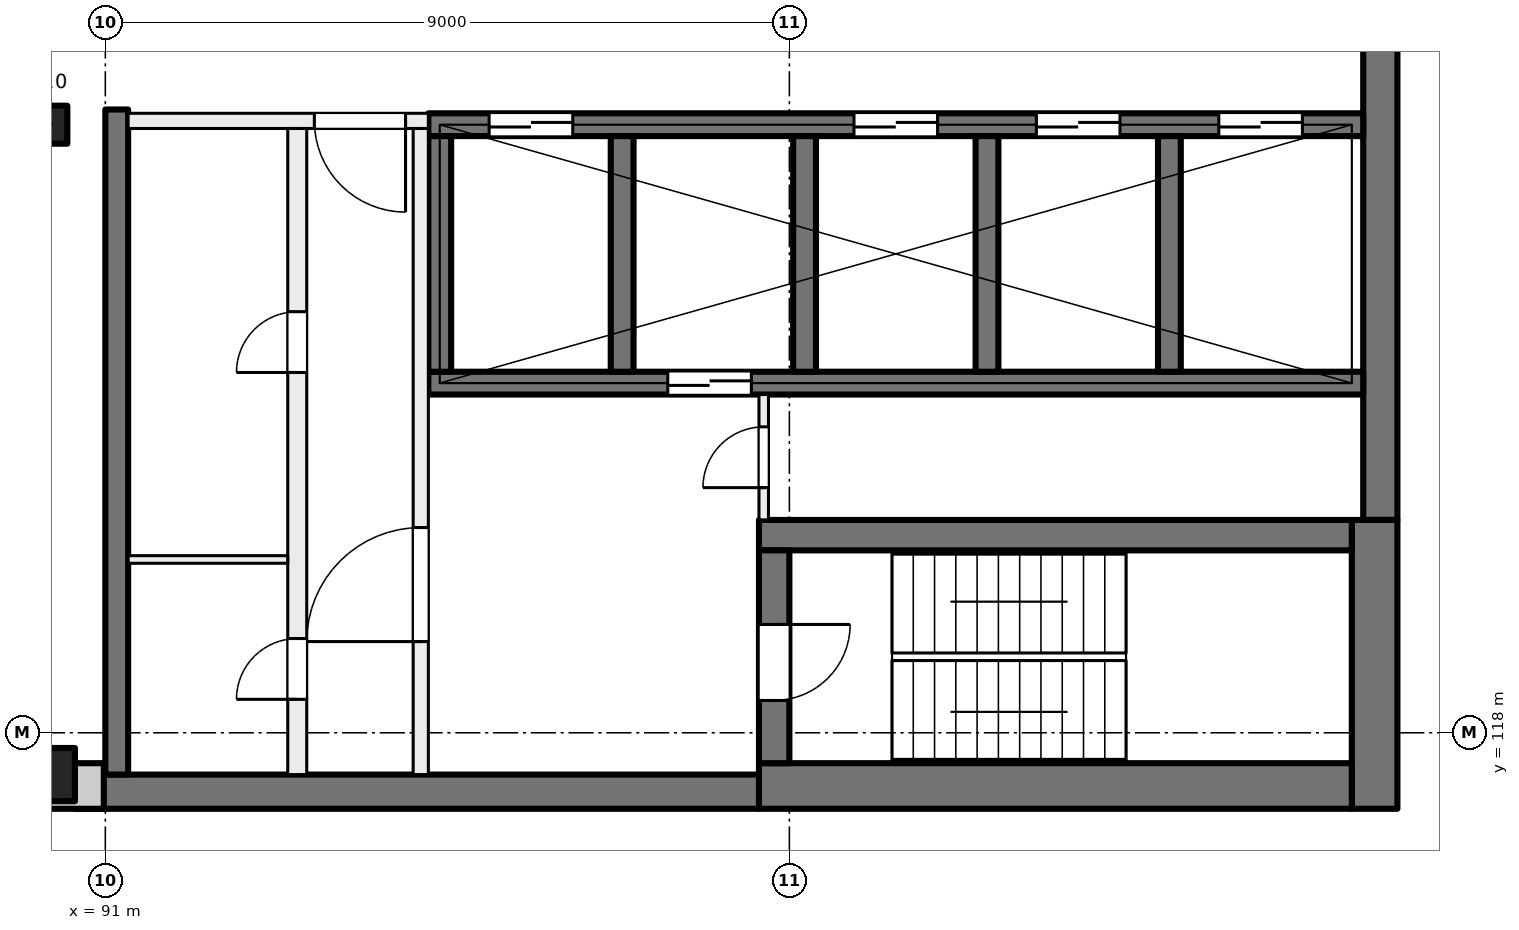
"""IFC4 building model, lengths in metres.
Left out: names, types, materials, properties, quantities, classifications, styles, units other than length and angle.
Written with IfcOpenShell. Run it as: python <this file> out.ifc"""

import sys

from ifc_helpers import new_model, si_unit, direction, frame, frame_2d, origin, origin_2d, place, context, subcontext, project, spatial, rectangle, extrude, element, fill, save


model = new_model("IFC4")
c1 = context("Model", 3, precision=1e-05, world=origin(), true_north=direction((0.0, 1.0)))
c2 = subcontext(c1, "Body", "Model", "MODEL_VIEW")
j1 = project(units=[si_unit("LENGTHUNIT", "METRE"), si_unit("PLANEANGLEUNIT", "RADIAN")], contexts=[c1])
p1 = place(None, origin())
s1 = spatial("IfcSite", under=j1, at=p1, CompositionType="ELEMENT")
p2 = place(p1, origin())
s2 = spatial("IfcBuilding", under=s1, at=p2, CompositionType="ELEMENT")
p3 = place(p2, frame((0.0, 0.0, 249.5)))
s3 = spatial("IfcBuildingStorey", under=s2, at=p3, CompositionType="ELEMENT", Elevation=249.5)
p4 = place(p3, frame((90.25, 126.0, 0.0), z_axis=(0.0, 0.0, 1.0), x_axis=(1.0, 0.0, 0.0)))
e1 = element("IfcColumn", 1, at=p4, inside=s3, PredefinedType="COLUMN", context=c2, shape_type="SweptSolid", body=[
    extrude(rectangle(XDim=0.5, YDim=0.5, at=origin_2d()), origin(), (0.0, 0.0, 1.0), 4.0),
])
p5 = place(p3, frame((90.25, 117.45, 0.0), z_axis=(0.0, 0.0, 1.0), x_axis=(1.0, 0.0, 0.0)))
e2 = element("IfcColumn", 2, at=p5, inside=s3, PredefinedType="COLUMN", context=c2, shape_type="SweptSolid", body=[
    extrude(rectangle(XDim=0.7, YDim=0.7, at=origin_2d()), origin(), (0.0, 0.0, 1.0), 4.0),
])
p6 = place(p3, frame((107.775, 135.2, 0.0), z_axis=(0.0, 0.0, 1.0), x_axis=(0.0, -1.0, 0.0)))
e3 = element("IfcWall", 3, at=p6, inside=s3, PredefinedType="SHEAR", context=c2, shape_type="SweptSolid", body=[
    extrude(rectangle(XDim=14.4, YDim=0.45, at=frame_2d((7.2, 0.0))), origin(), (0.0, 0.0, 1.0), 4.0),
])
p7 = place(p3, frame((107.7, 120.8, 0.0), z_axis=(0.0, 0.0, 1.0), x_axis=(0.0, -1.0, 0.0)))
e4 = element("IfcWall", 4, at=p7, inside=s3, PredefinedType="SHEAR", context=c2, shape_type="SweptSolid", body=[
    extrude(rectangle(XDim=3.8, YDim=0.6, at=frame_2d((1.9, 0.0))), origin(), (0.0, 0.0, 1.0), 4.0),
])
p8 = place(p3, frame((107.4, 117.3, 0.0), z_axis=(0.0, 0.0, 1.0), x_axis=(-1.0, 0.0, 0.0)))
e5 = element("IfcWall", 5, at=p8, inside=s3, PredefinedType="SHEAR", context=c2, shape_type="SweptSolid", body=[
    extrude(rectangle(XDim=7.8, YDim=0.6, at=frame_2d((3.9, 0.0))), origin(), (0.0, 0.0, 1.0), 4.0),
])
p9 = place(p3, frame((99.6, 117.225, 0.0), z_axis=(0.0, 0.0, 1.0), x_axis=(-1.0, 0.0, 0.0)))
e6 = element("IfcWall", 6, at=p9, inside=s3, PredefinedType="SHEAR", context=c2, shape_type="SweptSolid", body=[
    extrude(rectangle(XDim=9.0, YDim=0.45, at=frame_2d((4.5, 0.0))), origin(), (0.0, 0.0, 1.0), 4.0),
])
p10 = place(p3, frame((107.4, 120.6, 0.0), z_axis=(0.0, 0.0, 1.0), x_axis=(-1.0, 0.0, 0.0)))
e7 = element("IfcWall", 7, at=p10, inside=s3, PredefinedType="SHEAR", context=c2, shape_type="SweptSolid", body=[
    extrude(rectangle(XDim=7.8, YDim=0.4, at=frame_2d((3.9, 0.0))), origin(), (0.0, 0.0, 1.0), 4.0),
])
p11 = place(p3, frame((99.8, 120.4, 0.0), z_axis=(0.0, 0.0, 1.0), x_axis=(0.0, -1.0, 0.0)))
e8 = element("IfcWall", 8, at=p11, inside=s3, PredefinedType="SHEAR", context=c2, shape_type="SweptSolid", body=[
    extrude(rectangle(XDim=2.8, YDim=0.4, at=frame_2d((1.4, 0.0))), origin(), (0.0, 0.0, 1.0), 4.0),
])
p12 = place(p11, frame((0.975, 0.0, 0.0)))
e9 = element("IfcOpeningElement", 9, at=p12, cuts=e8, PredefinedType="OPENING", context=c2, shape_type="SweptSolid", body=[
    extrude(rectangle(XDim=1.0, YDim=2.1, at=frame_2d((0.5, 1.05))), frame((0.0, 0.21, 0.0), z_axis=(0.0, -1.0, 0.0), x_axis=(1.0, 0.0, 0.0)), (0.0, 0.0, 1.0), 0.42),
])
p13 = place(p3, frame((107.55, 126.0, 0.0), z_axis=(0.0, 0.0, 1.0), x_axis=(-1.0, 0.0, 0.0)))
e10 = element("IfcWall", 10, at=p13, inside=s3, PredefinedType="SHEAR", context=c2, shape_type="SweptSolid", body=[
    extrude(rectangle(XDim=12.3, YDim=0.3, at=frame_2d((6.15, 0.0))), origin(), (0.0, 0.0, 1.0), 4.0),
])
p14 = place(p13, frame((0.8, 0.0, 0.0)))
e11 = element("IfcOpeningElement", 11, at=p14, cuts=e10, PredefinedType="OPENING", context=c2, shape_type="SweptSolid", body=[
    extrude(rectangle(XDim=1.1, YDim=2.1, at=frame_2d((0.55, 1.05))), frame((0.0, 0.16, 0.0), z_axis=(0.0, -1.0, 0.0), x_axis=(1.0, 0.0, 0.0)), (0.0, 0.0, 1.0), 0.32),
])
p15 = place(p13, frame((3.2, 0.0, 0.0)))
e12 = element("IfcOpeningElement", 12, at=p15, cuts=e10, PredefinedType="OPENING", context=c2, shape_type="SweptSolid", body=[
    extrude(rectangle(XDim=1.1, YDim=2.1, at=frame_2d((0.55, 1.05))), frame((0.0, 0.16, 0.0), z_axis=(0.0, -1.0, 0.0), x_axis=(1.0, 0.0, 0.0)), (0.0, 0.0, 1.0), 0.32),
])
p16 = place(p13, frame((5.6, 0.0, 0.0)))
e13 = element("IfcOpeningElement", 13, at=p16, cuts=e10, PredefinedType="OPENING", context=c2, shape_type="SweptSolid", body=[
    extrude(rectangle(XDim=1.1, YDim=2.1, at=frame_2d((0.55, 1.05))), frame((0.0, 0.16, 0.0), z_axis=(0.0, -1.0, 0.0), x_axis=(1.0, 0.0, 0.0)), (0.0, 0.0, 1.0), 0.32),
])
p17 = place(p13, frame((10.4, 0.0, 0.0)))
e14 = element("IfcOpeningElement", 14, at=p17, cuts=e10, PredefinedType="OPENING", context=c2, shape_type="SweptSolid", body=[
    extrude(rectangle(XDim=1.1, YDim=2.1, at=frame_2d((0.55, 1.05))), frame((0.0, 0.16, 0.0), z_axis=(0.0, -1.0, 0.0), x_axis=(1.0, 0.0, 0.0)), (0.0, 0.0, 1.0), 0.32),
])
p18 = place(p3, frame((107.55, 122.6, 0.0), z_axis=(0.0, 0.0, 1.0), x_axis=(-1.0, 0.0, 0.0)))
e15 = element("IfcWall", 15, at=p18, inside=s3, PredefinedType="SHEAR", context=c2, shape_type="SweptSolid", body=[
    extrude(rectangle(XDim=12.3, YDim=0.3, at=frame_2d((6.15, 0.0))), origin(), (0.0, 0.0, 1.0), 4.0),
])
p19 = place(p18, frame((8.05, 0.0, 0.0)))
e16 = element("IfcOpeningElement", 16, at=p19, cuts=e15, PredefinedType="OPENING", context=c2, shape_type="SweptSolid", body=[
    extrude(rectangle(XDim=1.1, YDim=2.1, at=frame_2d((0.55, 1.05))), frame((0.0, 0.16, 0.0), z_axis=(0.0, -1.0, 0.0), x_axis=(1.0, 0.0, 0.0)), (0.0, 0.0, 1.0), 0.32),
])
for number, where, z_axis, x_axis in (
    (17, (105.0, 125.85, 0.0), (0.0, 0.0, 1.0), (0.0, -1.0, 0.0)),
    (18, (102.6, 125.85, 0.0), (0.0, 0.0, 1.0), (0.0, -1.0, 0.0)),
    (19, (100.2, 125.85, 0.0), (0.0, 0.0, 1.0), (0.0, -1.0, 0.0)),
    (20, (97.8, 125.85, 0.0), (0.0, 0.0, 1.0), (0.0, -1.0, 0.0)),
    (21, (95.4, 125.85, 0.0), (0.0, 0.0, 1.0), (0.0, -1.0, 0.0)),
):
    element("IfcWall", number, at=place(p3, frame(where, z_axis=z_axis, x_axis=x_axis)), inside=s3, PredefinedType="SHEAR", context=c2, shape_type="SweptSolid", body=[
        extrude(rectangle(XDim=3.1, YDim=0.3, at=frame_2d((1.55, 0.0))), origin(), (0.0, 0.0, 1.0), 4.0),
    ])
p20 = place(p3, frame((91.15, 126.2, 0.0), z_axis=(0.0, 0.0, 1.0), x_axis=(0.0, -1.0, 0.0)))
e22 = element("IfcWall", 22, at=p20, inside=s3, PredefinedType="SHEAR", context=c2, shape_type="SweptSolid", body=[
    extrude(rectangle(XDim=8.75, YDim=0.3, at=frame_2d((4.375, 0.0))), origin(), (0.0, 0.0, 1.0), 4.0),
])
p21 = place(p3, frame((90.98, 117.3, 0.0), z_axis=(0.0, 0.0, 1.0), x_axis=(-1.0, 0.0, 0.0)))
e23 = element("IfcWall", 23, at=p21, inside=s3, PredefinedType="SOLIDWALL", context=c2, shape_type="SweptSolid", body=[
    extrude(rectangle(XDim=43.98, YDim=0.6, at=frame_2d((21.99, 0.0))), origin(), (0.0, 0.0, 1.0), 3.625),
])
p22 = place(p21, frame((1.48, 0.0, 0.9)))
e24 = element("IfcOpeningElement", 24, at=p22, cuts=e23, PredefinedType="OPENING", context=c2, shape_type="SweptSolid", body=[
    extrude(rectangle(XDim=3.0, YDim=2.4, at=frame_2d((1.5, 1.2))), frame((0.0, 0.31, 0.0), z_axis=(0.0, -1.0, 0.0), x_axis=(1.0, 0.0, 0.0)), (0.0, 0.0, 1.0), 0.62),
])
p23 = place(p21, frame((5.98, 0.0, 0.9)))
e25 = element("IfcOpeningElement", 25, at=p23, cuts=e23, PredefinedType="OPENING", context=c2, shape_type="SweptSolid", body=[
    extrude(rectangle(XDim=3.0, YDim=2.4, at=frame_2d((1.5, 1.2))), frame((0.0, 0.31, 0.0), z_axis=(0.0, -1.0, 0.0), x_axis=(1.0, 0.0, 0.0)), (0.0, 0.0, 1.0), 0.62),
])
p24 = place(p21, frame((10.48, 0.0, 0.9)))
e26 = element("IfcOpeningElement", 26, at=p24, cuts=e23, PredefinedType="OPENING", context=c2, shape_type="SweptSolid", body=[
    extrude(rectangle(XDim=3.0, YDim=2.4, at=frame_2d((1.5, 1.2))), frame((0.0, 0.31, 0.0), z_axis=(0.0, -1.0, 0.0), x_axis=(1.0, 0.0, 0.0)), (0.0, 0.0, 1.0), 0.62),
])
p25 = place(p21, frame((14.98, 0.0, 0.9)))
e27 = element("IfcOpeningElement", 27, at=p25, cuts=e23, PredefinedType="OPENING", context=c2, shape_type="SweptSolid", body=[
    extrude(rectangle(XDim=3.0, YDim=2.4, at=frame_2d((1.5, 1.2))), frame((0.0, 0.31, 0.0), z_axis=(0.0, -1.0, 0.0), x_axis=(1.0, 0.0, 0.0)), (0.0, 0.0, 1.0), 0.62),
])
p26 = place(p21, frame((19.48, 0.0, 0.9)))
e28 = element("IfcOpeningElement", 28, at=p26, cuts=e23, PredefinedType="OPENING", context=c2, shape_type="SweptSolid", body=[
    extrude(rectangle(XDim=3.0, YDim=2.4, at=frame_2d((1.5, 1.2))), frame((0.0, 0.31, 0.0), z_axis=(0.0, -1.0, 0.0), x_axis=(1.0, 0.0, 0.0)), (0.0, 0.0, 1.0), 0.62),
])
p27 = place(p21, frame((23.98, 0.0, 0.9)))
e29 = element("IfcOpeningElement", 29, at=p27, cuts=e23, PredefinedType="OPENING", context=c2, shape_type="SweptSolid", body=[
    extrude(rectangle(XDim=3.0, YDim=2.4, at=frame_2d((1.5, 1.2))), frame((0.0, 0.31, 0.0), z_axis=(0.0, -1.0, 0.0), x_axis=(1.0, 0.0, 0.0)), (0.0, 0.0, 1.0), 0.62),
])
p28 = place(p21, frame((28.48, 0.0, 0.9)))
e30 = element("IfcOpeningElement", 30, at=p28, cuts=e23, PredefinedType="OPENING", context=c2, shape_type="SweptSolid", body=[
    extrude(rectangle(XDim=3.0, YDim=2.4, at=frame_2d((1.5, 1.2))), frame((0.0, 0.31, 0.0), z_axis=(0.0, -1.0, 0.0), x_axis=(1.0, 0.0, 0.0)), (0.0, 0.0, 1.0), 0.62),
])
p29 = place(p21, frame((32.98, 0.0, 0.9)))
e31 = element("IfcOpeningElement", 31, at=p29, cuts=e23, PredefinedType="OPENING", context=c2, shape_type="SweptSolid", body=[
    extrude(rectangle(XDim=3.0, YDim=2.4, at=frame_2d((1.5, 1.2))), frame((0.0, 0.31, 0.0), z_axis=(0.0, -1.0, 0.0), x_axis=(1.0, 0.0, 0.0)), (0.0, 0.0, 1.0), 0.62),
])
p30 = place(p21, frame((37.48, 0.0, 0.9)))
e32 = element("IfcOpeningElement", 32, at=p30, cuts=e23, PredefinedType="OPENING", context=c2, shape_type="SweptSolid", body=[
    extrude(rectangle(XDim=3.0, YDim=2.4, at=frame_2d((1.5, 1.2))), frame((0.0, 0.31, 0.0), z_axis=(0.0, -1.0, 0.0), x_axis=(1.0, 0.0, 0.0)), (0.0, 0.0, 1.0), 0.62),
])
p31 = place(p3, frame((95.25, 126.05, 0.0), z_axis=(0.0, 0.0, 1.0), x_axis=(-1.0, 0.0, 0.0)))
e33 = element("IfcWall", 33, at=p31, inside=s3, PredefinedType="PARTITIONING", context=c2, shape_type="SweptSolid", body=[
    extrude(rectangle(XDim=3.95, YDim=0.2, at=frame_2d((1.975, 0.0))), origin(), (0.0, 0.0, 1.0), 3.625),
])
p32 = place(p31, frame((0.3, 0.0, 0.0)))
e34 = element("IfcOpeningElement", 34, at=p32, cuts=e33, PredefinedType="OPENING", context=c2, shape_type="SweptSolid", body=[
    extrude(rectangle(XDim=1.2, YDim=2.1, at=frame_2d((0.6, 1.05))), frame((0.0, 0.11, 0.0), z_axis=(0.0, -1.0, 0.0), x_axis=(1.0, 0.0, 0.0)), (0.0, 0.0, 1.0), 0.22),
])
p33 = place(p3, frame((95.15, 117.45, 0.0), z_axis=(0.0, 0.0, 1.0), x_axis=(0.0, 1.0, 0.0)))
e35 = element("IfcWall", 35, at=p33, inside=s3, PredefinedType="PARTITIONING", context=c2, shape_type="SweptSolid", body=[
    extrude(rectangle(XDim=8.5, YDim=0.2, at=frame_2d((4.25, 0.0))), origin(), (0.0, 0.0, 1.0), 3.625),
])
p34 = place(p33, frame((1.75, 0.0, 0.0)))
e36 = element("IfcOpeningElement", 36, at=p34, cuts=e35, PredefinedType="OPENING", context=c2, shape_type="SweptSolid", body=[
    extrude(rectangle(XDim=1.5, YDim=2.1, at=frame_2d((0.75, 1.05))), frame((0.0, 0.11, 0.0), z_axis=(0.0, -1.0, 0.0), x_axis=(1.0, 0.0, 0.0)), (0.0, 0.0, 1.0), 0.22),
])
p35 = place(p3, frame((93.525, 117.45, 0.0), z_axis=(0.0, 0.0, 1.0), x_axis=(0.0, 1.0, 0.0)))
e37 = element("IfcWall", 37, at=p35, inside=s3, PredefinedType="PARTITIONING", context=c2, shape_type="SweptSolid", body=[
    extrude(rectangle(XDim=8.5, YDim=0.25, at=frame_2d((4.25, 0.0))), origin(), (0.0, 0.0, 1.0), 3.625),
])
p36 = place(p35, frame((5.29, 0.0, 0.0)))
e38 = element("IfcOpeningElement", 38, at=p36, cuts=e37, PredefinedType="OPENING", context=c2, shape_type="SweptSolid", body=[
    extrude(rectangle(XDim=0.8, YDim=2.1, at=frame_2d((0.4, 1.05))), frame((0.0, 0.135, 0.0), z_axis=(0.0, -1.0, 0.0), x_axis=(1.0, 0.0, 0.0)), (0.0, 0.0, 1.0), 0.27),
])
p37 = place(p35, frame((0.99, 0.0, 0.0)))
e39 = element("IfcOpeningElement", 39, at=p37, cuts=e37, PredefinedType="OPENING", context=c2, shape_type="SweptSolid", body=[
    extrude(rectangle(XDim=0.8, YDim=2.1, at=frame_2d((0.4, 1.05))), frame((0.0, 0.135, 0.0), z_axis=(0.0, -1.0, 0.0), x_axis=(1.0, 0.0, 0.0)), (0.0, 0.0, 1.0), 0.27),
])
p38 = place(p3, frame((99.663, 120.8, 0.0), z_axis=(0.0, 0.0, 1.0), x_axis=(0.0, 1.0, 0.0)))
e40 = element("IfcWall", 40, at=p38, inside=s3, PredefinedType="PARTITIONING", context=c2, shape_type="SweptSolid", body=[
    extrude(rectangle(XDim=1.65, YDim=0.125, at=frame_2d((0.825, 0.0))), origin(), (0.0, 0.0, 1.0), 3.625),
])
p39 = place(p38, frame((0.425, 0.0, 0.0)))
e41 = element("IfcOpeningElement", 41, at=p39, cuts=e40, PredefinedType="OPENING", context=c2, shape_type="SweptSolid", body=[
    extrude(rectangle(XDim=0.8, YDim=2.1, at=frame_2d((0.4, 1.05))), frame((0.0, 0.073, 0.0), z_axis=(0.0, -1.0, 0.0), x_axis=(1.0, 0.0, 0.0)), (0.0, 0.0, 1.0), 0.145),
])
p40 = place(p3, frame((93.4, 120.28, 0.0), z_axis=(0.0, 0.0, 1.0), x_axis=(-1.0, 0.0, 0.0)))
e42 = element("IfcWall", 42, at=p40, inside=s3, PredefinedType="PARTITIONING", context=c2, shape_type="SweptSolid", body=[
    extrude(rectangle(XDim=2.1, YDim=0.1, at=frame_2d((1.05, 0.0))), origin(), (0.0, 0.0, 1.0), 3.625),
])
p41 = place(p14, origin())
e43 = element("IfcDoor", 43, at=p41, inside=s3, OperationType="DOUBLE_DOOR_SLIDING", PredefinedType="DOOR", context=c2, shape_type="SweptSolid", body=[
    extrude(rectangle(XDim=1.1, YDim=2.1, at=frame_2d((0.55, 1.05))), frame((0.0, 0.025, 0.0), z_axis=(0.0, -1.0, 0.0), x_axis=(1.0, 0.0, 0.0)), (0.0, 0.0, 1.0), 0.05),
])
fill(e11, e43)
p42 = place(p15, origin())
e44 = element("IfcDoor", 44, at=p42, inside=s3, OperationType="DOUBLE_DOOR_SLIDING", PredefinedType="DOOR", context=c2, shape_type="SweptSolid", body=[
    extrude(rectangle(XDim=1.1, YDim=2.1, at=frame_2d((0.55, 1.05))), frame((0.0, 0.025, 0.0), z_axis=(0.0, -1.0, 0.0), x_axis=(1.0, 0.0, 0.0)), (0.0, 0.0, 1.0), 0.05),
])
fill(e12, e44)
p43 = place(p16, origin())
e45 = element("IfcDoor", 45, at=p43, inside=s3, OperationType="DOUBLE_DOOR_SLIDING", PredefinedType="DOOR", context=c2, shape_type="SweptSolid", body=[
    extrude(rectangle(XDim=1.1, YDim=2.1, at=frame_2d((0.55, 1.05))), frame((0.0, 0.025, 0.0), z_axis=(0.0, -1.0, 0.0), x_axis=(1.0, 0.0, 0.0)), (0.0, 0.0, 1.0), 0.05),
])
fill(e13, e45)
p44 = place(p17, origin())
e46 = element("IfcDoor", 46, at=p44, inside=s3, OperationType="DOUBLE_DOOR_SLIDING", PredefinedType="DOOR", context=c2, shape_type="SweptSolid", body=[
    extrude(rectangle(XDim=1.1, YDim=2.1, at=frame_2d((0.55, 1.05))), frame((0.0, 0.025, 0.0), z_axis=(0.0, -1.0, 0.0), x_axis=(1.0, 0.0, 0.0)), (0.0, 0.0, 1.0), 0.05),
])
fill(e14, e46)
p45 = place(p32, origin())
e47 = element("IfcDoor", 47, at=p45, inside=s3, OperationType="DOUBLE_DOOR_SINGLE_SWING", PredefinedType="DOOR", context=c2, shape_type="SweptSolid", body=[
    extrude(rectangle(XDim=1.2, YDim=2.1, at=frame_2d((0.6, 1.05))), frame((0.0, 0.025, 0.0), z_axis=(0.0, -1.0, 0.0), x_axis=(1.0, 0.0, 0.0)), (0.0, 0.0, 1.0), 0.05),
])
fill(e34, e47)
p46 = place(p34, origin())
e48 = element("IfcDoor", 48, at=p46, inside=s3, OperationType="DOUBLE_DOOR_SINGLE_SWING", PredefinedType="DOOR", context=c2, shape_type="SweptSolid", body=[
    extrude(rectangle(XDim=1.5, YDim=2.1, at=frame_2d((0.75, 1.05))), frame((0.0, 0.025, 0.0), z_axis=(0.0, -1.0, 0.0), x_axis=(1.0, 0.0, 0.0)), (0.0, 0.0, 1.0), 0.05),
])
fill(e36, e48)
p47 = place(p12, origin())
e49 = element("IfcDoor", 49, at=p47, inside=s3, OperationType="SINGLE_SWING_LEFT", PredefinedType="DOOR", context=c2, shape_type="SweptSolid", body=[
    extrude(rectangle(XDim=1.0, YDim=2.1, at=frame_2d((0.5, 1.05))), frame((0.0, 0.025, 0.0), z_axis=(0.0, -1.0, 0.0), x_axis=(1.0, 0.0, 0.0)), (0.0, 0.0, 1.0), 0.05),
])
fill(e9, e49)
p48 = place(p39, origin())
e50 = element("IfcDoor", 50, at=p48, inside=s3, OperationType="SINGLE_SWING_RIGHT", PredefinedType="DOOR", context=c2, shape_type="SweptSolid", body=[
    extrude(rectangle(XDim=0.8, YDim=2.1, at=frame_2d((0.4, 1.05))), frame((0.0, 0.025, 0.0), z_axis=(0.0, -1.0, 0.0), x_axis=(1.0, 0.0, 0.0)), (0.0, 0.0, 1.0), 0.05),
])
fill(e41, e50)
p49 = place(p36, origin())
e51 = element("IfcDoor", 51, at=p49, inside=s3, OperationType="SINGLE_SWING_LEFT", PredefinedType="DOOR", context=c2, shape_type="SweptSolid", body=[
    extrude(rectangle(XDim=0.8, YDim=2.1, at=frame_2d((0.4, 1.05))), frame((0.0, 0.025, 0.0), z_axis=(0.0, -1.0, 0.0), x_axis=(1.0, 0.0, 0.0)), (0.0, 0.0, 1.0), 0.05),
])
fill(e38, e51)
p50 = place(p37, origin())
e52 = element("IfcDoor", 52, at=p50, inside=s3, OperationType="SINGLE_SWING_RIGHT", PredefinedType="DOOR", context=c2, shape_type="SweptSolid", body=[
    extrude(rectangle(XDim=0.8, YDim=2.1, at=frame_2d((0.4, 1.05))), frame((0.0, 0.025, 0.0), z_axis=(0.0, -1.0, 0.0), x_axis=(1.0, 0.0, 0.0)), (0.0, 0.0, 1.0), 0.05),
])
fill(e39, e52)
p51 = place(p19, origin())
e53 = element("IfcDoor", 53, at=p51, inside=s3, OperationType="DOUBLE_DOOR_SLIDING", PredefinedType="DOOR", context=c2, shape_type="SweptSolid", body=[
    extrude(rectangle(XDim=1.1, YDim=2.1, at=frame_2d((0.55, 1.05))), frame((0.0, 0.025, 0.0), z_axis=(0.0, -1.0, 0.0), x_axis=(1.0, 0.0, 0.0)), (0.0, 0.0, 1.0), 0.05),
])
fill(e16, e53)
save(model, sys.argv[1])
